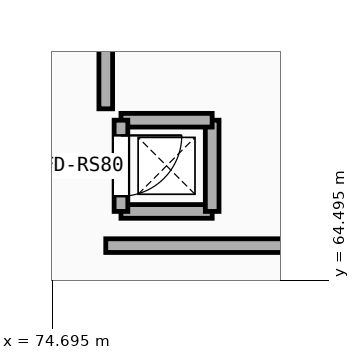
"""IFC4 building model, lengths in metres.
Left out: names, types, materials, properties, quantities, classifications, styles, units other than length and angle.
Written with IfcOpenShell. Run it as: python <this file> out.ifc"""

import sys

from ifc_helpers import new_model, si_unit, direction, frame, frame_2d, origin, place, context, subcontext, project, spatial, rectangle, extrude, element, fill, save


model = new_model("IFC4")
c1 = context("Model", 3, precision=1e-05, world=origin(), true_north=direction((0.0, 1.0)))
c2 = subcontext(c1, "Body", "Model", "MODEL_VIEW")
j1 = project(units=[si_unit("LENGTHUNIT", "METRE"), si_unit("PLANEANGLEUNIT", "RADIAN")], contexts=[c1])
p1 = place(None, origin())
s1 = spatial("IfcSite", under=j1, at=p1, CompositionType="ELEMENT")
p2 = place(p1, origin())
s2 = spatial("IfcBuilding", under=s1, at=p2, CompositionType="ELEMENT")
p3 = place(p2, frame((0.0, 0.0, 5.4)))
s3 = spatial("IfcBuildingStorey", under=s2, at=p3, CompositionType="ELEMENT", Elevation=5.4)
p4 = place(p3, frame((75.4, 64.95, 0.0), z_axis=(0.0, 0.0, 1.0), x_axis=(1.0, 0.0, 0.0)))
e1 = element("IfcWall", 1, at=p4, inside=s3, PredefinedType="PARTITIONING", context=c2, shape_type="SweptSolid", body=[
    extrude(rectangle(XDim=11.26, YDim=0.18, at=frame_2d((5.63, 0.0))), origin(), (0.0, 0.0, 1.0), 3.37),
])
p5 = place(p3, frame((75.4, 66.75, 0.0), z_axis=(0.0, 0.0, 1.0), x_axis=(0.0, 1.0, 0.0)))
e2 = element("IfcWall", 2, at=p5, inside=s3, PredefinedType="PARTITIONING", context=c2, shape_type="SweptSolid", body=[
    extrude(rectangle(XDim=30.75, YDim=0.18, at=frame_2d((15.375, 0.0))), origin(), (0.0, 0.0, 1.0), 3.25),
])
p6 = place(p5, frame((6.413, 0.0, -0.01)))
e3 = element("IfcOpeningElement", 3, at=p6, cuts=e2, PredefinedType="OPENING", context=c2, shape_type="SweptSolid", body=[
    extrude(rectangle(XDim=1.6, YDim=2.21, at=frame_2d((0.8, 1.105))), frame((0.0, 0.1, 0.0), z_axis=(0.0, -1.0, 0.0), x_axis=(1.0, 0.0, 0.0)), (0.0, 0.0, 1.0), 0.2),
])
p7 = place(p3, frame((75.6, 65.4, 0.0), z_axis=(0.0, 0.0, 1.0), x_axis=(1.0, 0.0, 0.0)))
e4 = element("IfcWall", 4, at=p7, inside=s3, PredefinedType="SOLIDWALL", context=c2, shape_type="SweptSolid", body=[
    extrude(rectangle(XDim=1.2, YDim=0.18, at=frame_2d((0.6, 0.0))), origin(), (0.0, 0.0, 1.0), 3.97),
])
p8 = place(p3, frame((76.8, 65.4, 0.0), z_axis=(0.0, 0.0, 1.0), x_axis=(0.0, 1.0, 0.0)))
e5 = element("IfcWall", 5, at=p8, inside=s3, PredefinedType="SOLIDWALL", context=c2, shape_type="SweptSolid", body=[
    extrude(rectangle(XDim=1.2, YDim=0.18, at=frame_2d((0.6, 0.0))), origin(), (0.0, 0.0, 1.0), 3.97),
])
p9 = place(p3, frame((76.8, 66.6, 0.0), z_axis=(0.0, 0.0, 1.0), x_axis=(-1.0, 0.0, 0.0)))
e6 = element("IfcWall", 6, at=p9, inside=s3, PredefinedType="SOLIDWALL", context=c2, shape_type="SweptSolid", body=[
    extrude(rectangle(XDim=1.2, YDim=0.18, at=frame_2d((0.6, 0.0))), origin(), (0.0, 0.0, 1.0), 3.97),
])
p10 = place(p3, frame((75.6, 66.6, 0.0), z_axis=(0.0, 0.0, 1.0), x_axis=(0.0, -1.0, 0.0)))
e7 = element("IfcWall", 7, at=p10, inside=s3, PredefinedType="SOLIDWALL", context=c2, shape_type="SweptSolid", body=[
    extrude(rectangle(XDim=1.2, YDim=0.18, at=frame_2d((0.6, 0.0))), origin(), (0.0, 0.0, 1.0), 3.97),
])
p11 = place(p10, frame((0.2, 0.0, -0.01)))
e8 = element("IfcOpeningElement", 8, at=p11, cuts=e7, PredefinedType="OPENING", context=c2, shape_type="SweptSolid", body=[
    extrude(rectangle(XDim=0.8, YDim=2.06, at=frame_2d((0.4, 1.03))), frame((0.0, 0.1, 0.0), z_axis=(0.0, -1.0, 0.0), x_axis=(1.0, 0.0, 0.0)), (0.0, 0.0, 1.0), 0.2),
])
p12 = place(p11, frame((0.0, 0.0, 0.01)))
e9 = element("IfcDoor", 9, at=p12, inside=s3, OperationType="SINGLE_SWING_LEFT", PredefinedType="DOOR", context=c2, shape_type="SweptSolid", body=[
    extrude(rectangle(XDim=0.8, YDim=2.05, at=frame_2d((0.4, 1.025))), frame((0.0, 0.025, 0.0), z_axis=(0.0, -1.0, 0.0), x_axis=(1.0, 0.0, 0.0)), (0.0, 0.0, 1.0), 0.05),
])
fill(e8, e9)
save(model, sys.argv[1])
